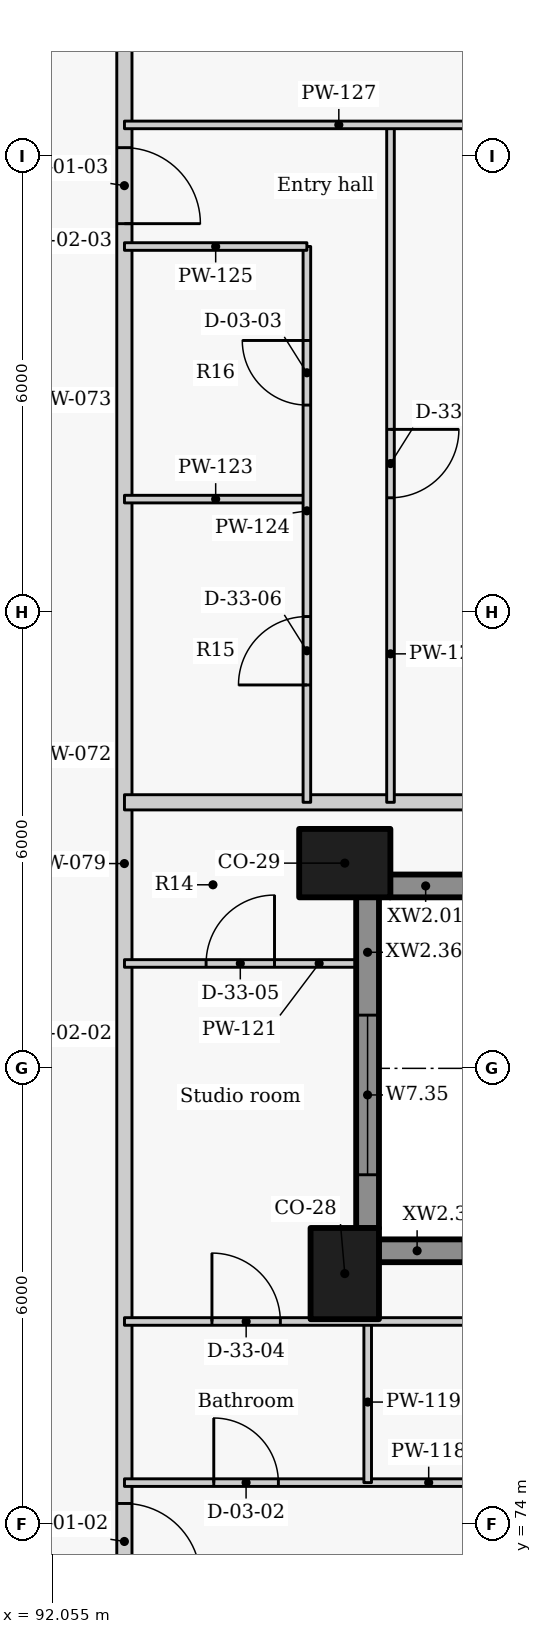
"""IFC4 building model, lengths in metres.
Left out: names, types, materials, properties, quantities, classifications, styles, units other than length and angle.
Written with IfcOpenShell. Run it as: python <this file> out.ifc"""

import sys

from ifc_helpers import new_model, si_unit, direction, frame, frame_2d, origin, origin_2d, place, context, subcontext, project, spatial, rectangle, extrude, element, fill, save


model = new_model("IFC4")
c1 = context("Model", 3, precision=1e-05, world=origin(), true_north=direction((0.0, 1.0)))
c2 = subcontext(c1, "Body", "Model", "MODEL_VIEW")
j1 = project(units=[si_unit("LENGTHUNIT", "METRE"), si_unit("PLANEANGLEUNIT", "RADIAN")], contexts=[c1])
p1 = place(None, origin())
s1 = spatial("IfcSite", under=j1, at=p1, CompositionType="ELEMENT")
p2 = place(p1, origin())
s2 = spatial("IfcBuilding", under=s1, at=p2, CompositionType="ELEMENT")
p3 = place(p2, frame((0.0, 0.0, 193.2)))
s3 = spatial("IfcBuildingStorey", under=s2, at=p3, CompositionType="ELEMENT", Elevation=193.2)
for number, where, z_axis, x_axis in (
    (1, (95.899, 77.3, 0.0), (0.0, 0.0, 1.0), (0.0, 1.0, 0.0)),
    (2, (95.899, 82.7, 0.0), (0.0, 0.0, 1.0), (1.0, 0.0, 0.0)),
):
    element("IfcColumn", number, at=place(p3, frame(where, z_axis=z_axis, x_axis=x_axis)), inside=s3, PredefinedType="COLUMN", context=c2, shape_type="SweptSolid", body=[
        extrude(rectangle(XDim=1.2, YDim=0.9, at=origin_2d()), origin(), (0.0, 0.0, 1.0), 3.3),
    ])
p4 = place(p3, frame((96.496, 82.4, 0.0), z_axis=(0.0, 0.0, 1.0), x_axis=(1.0, 0.0, 0.0)))
e3 = element("IfcWall", 3, at=p4, inside=s3, PredefinedType="SOLIDWALL", context=c2, shape_type="SweptSolid", body=[
    extrude(rectangle(XDim=4.172, YDim=0.3, at=frame_2d((2.086, 0.0))), origin(), (0.0, 0.0, 1.0), 2.425),
])
p5 = place(p4, frame((1.036, 0.0, 0.9)))
e4 = element("IfcOpeningElement", 4, at=p5, cuts=e3, PredefinedType="OPENING", context=c2, shape_type="SweptSolid", body=[
    extrude(rectangle(XDim=2.1, YDim=1.1, at=frame_2d((1.05, 0.55))), frame((0.0, 0.16, 0.0), z_axis=(0.0, -1.0, 0.0), x_axis=(1.0, 0.0, 0.0)), (0.0, 0.0, 1.0), 0.32),
])
p6 = place(p3, frame((99.101, 91.916, 0.0), z_axis=(0.0, 0.0, 1.0), x_axis=(-0.500059225181, 0.86599120741, 0.0)))
e5 = element("IfcWall", 5, at=p6, inside=s3, PredefinedType="SOLIDWALL", context=c2, shape_type="SweptSolid", body=[
    extrude(rectangle(XDim=3.744, YDim=0.3, at=frame_2d((1.872, 0.0))), origin(), (0.0, 0.0, 1.0), 2.425),
])
p7 = place(p6, frame((1.145, 0.0, 0.9)))
e6 = element("IfcOpeningElement", 6, at=p7, cuts=e5, PredefinedType="OPENING", context=c2, shape_type="SweptSolid", body=[
    extrude(rectangle(XDim=2.1, YDim=1.1, at=frame_2d((1.05, 0.55))), frame((0.0, 0.16, 0.0), z_axis=(0.0, -1.0, 0.0), x_axis=(1.0, 0.0, 0.0)), (0.0, 0.0, 1.0), 0.32),
])
p8 = place(p3, frame((100.668, 77.6, 0.0), z_axis=(0.0, 0.0, 1.0), x_axis=(-1.0, 0.0, 0.0)))
e7 = element("IfcWall", 7, at=p8, inside=s3, PredefinedType="SOLIDWALL", context=c2, shape_type="SweptSolid", body=[
    extrude(rectangle(XDim=4.323, YDim=0.3, at=frame_2d((2.161, 0.0))), origin(), (0.0, 0.0, 1.0), 2.425),
])
p9 = place(p8, frame((1.111, 0.0, 0.9)))
e8 = element("IfcOpeningElement", 8, at=p9, cuts=e7, PredefinedType="OPENING", context=c2, shape_type="SweptSolid", body=[
    extrude(rectangle(XDim=2.1, YDim=1.1, at=frame_2d((1.05, 0.55))), frame((0.0, 0.16, 0.0), z_axis=(0.0, -1.0, 0.0), x_axis=(1.0, 0.0, 0.0)), (0.0, 0.0, 1.0), 0.32),
])
p10 = place(p3, frame((96.199, 77.896, 0.0), z_axis=(0.0, 0.0, 1.0), x_axis=(0.0, 1.0, 0.0)))
e9 = element("IfcWall", 9, at=p10, inside=s3, PredefinedType="SOLIDWALL", context=c2, shape_type="SweptSolid", body=[
    extrude(rectangle(XDim=4.358, YDim=0.3, at=frame_2d((2.179, 0.0))), origin(), (0.0, 0.0, 1.0), 2.425),
])
p11 = place(p10, frame((0.704, 0.0, 0.9)))
e10 = element("IfcOpeningElement", 10, at=p11, cuts=e9, PredefinedType="OPENING", context=c2, shape_type="SweptSolid", body=[
    extrude(rectangle(XDim=2.1, YDim=1.1, at=frame_2d((1.05, 0.55))), frame((0.0, 0.16, 0.0), z_axis=(0.0, -1.0, 0.0), x_axis=(1.0, 0.0, 0.0)), (0.0, 0.0, 1.0), 0.32),
])
p12 = place(p3, frame((93.0, 101.281, 0.0), z_axis=(0.0, 0.0, 1.0), x_axis=(0.0, -1.0, 0.0)))
e11 = element("IfcWall", 11, at=p12, inside=s3, PredefinedType="PARTITIONING", context=c2, shape_type="SweptSolid", body=[
    extrude(rectangle(XDim=42.606, YDim=0.2, at=frame_2d((21.303, 0.0))), origin(), (0.0, 0.0, 1.0), 2.405),
])
p13 = place(p12, frame((39.33, 0.0, 0.0)))
e12 = element("IfcOpeningElement", 12, at=p13, cuts=e11, PredefinedType="OPENING", context=c2, shape_type="SweptSolid", body=[
    extrude(rectangle(XDim=1.0, YDim=2.1, at=frame_2d((0.5, 1.05))), frame((0.0, 0.11, 0.0), z_axis=(0.0, -1.0, 0.0), x_axis=(1.0, 0.0, 0.0)), (0.0, 0.0, 1.0), 0.22),
])
p14 = place(p12, frame((27.005, 0.0, 0.0)))
e13 = element("IfcOpeningElement", 13, at=p14, cuts=e11, PredefinedType="OPENING", context=c2, shape_type="SweptSolid", body=[
    extrude(rectangle(XDim=1.0, YDim=2.1, at=frame_2d((0.5, 1.05))), frame((0.0, 0.11, 0.0), z_axis=(0.0, -1.0, 0.0), x_axis=(1.0, 0.0, 0.0)), (0.0, 0.0, 1.0), 0.22),
])
p15 = place(p12, frame((9.168, 0.0, 0.0)))
e14 = element("IfcOpeningElement", 14, at=p15, cuts=e11, PredefinedType="OPENING", context=c2, shape_type="SweptSolid", body=[
    extrude(rectangle(XDim=1.0, YDim=2.1, at=frame_2d((0.5, 1.05))), frame((0.0, 0.11, 0.0), z_axis=(0.0, -1.0, 0.0), x_axis=(1.0, 0.0, 0.0)), (0.0, 0.0, 1.0), 0.22),
])
p16 = place(p12, frame((3.937, 0.0, 0.0)))
e15 = element("IfcOpeningElement", 15, at=p16, cuts=e11, PredefinedType="OPENING", context=c2, shape_type="SweptSolid", body=[
    extrude(rectangle(XDim=1.0, YDim=2.1, at=frame_2d((0.5, 1.05))), frame((0.0, 0.11, 0.0), z_axis=(0.0, -1.0, 0.0), x_axis=(1.0, 0.0, 0.0)), (0.0, 0.0, 1.0), 0.22),
])
p17 = place(p3, frame((93.001, 74.55, 0.0), z_axis=(0.0, 0.0, 1.0), x_axis=(1.0, 0.0, 0.0)))
e16 = element("IfcWall", 16, at=p17, inside=s3, PredefinedType="PARTITIONING", context=c2, shape_type="SweptSolid", body=[
    extrude(rectangle(XDim=9.66, YDim=0.1, at=frame_2d((4.83, 0.0))), origin(), (0.0, 0.0, 1.0), 2.405),
])
p18 = place(p17, frame((1.175, 0.0, 0.0)))
e17 = element("IfcOpeningElement", 17, at=p18, cuts=e16, PredefinedType="OPENING", context=c2, shape_type="SweptSolid", body=[
    extrude(rectangle(XDim=0.85, YDim=2.1, at=frame_2d((0.425, 1.05))), frame((0.0, 0.06, 0.0), z_axis=(0.0, -1.0, 0.0), x_axis=(1.0, 0.0, 0.0)), (0.0, 0.0, 1.0), 0.12),
])
p19 = place(p17, frame((5.98, 0.0, 0.0)))
e18 = element("IfcOpeningElement", 18, at=p19, cuts=e16, PredefinedType="OPENING", context=c2, shape_type="SweptSolid", body=[
    extrude(rectangle(XDim=0.9, YDim=2.1, at=frame_2d((0.45, 1.05))), frame((0.0, 0.06, 0.0), z_axis=(0.0, -1.0, 0.0), x_axis=(1.0, 0.0, 0.0)), (0.0, 0.0, 1.0), 0.12),
])
p20 = place(p3, frame((96.201, 74.55, 0.0), z_axis=(0.0, 0.0, 1.0), x_axis=(0.0, 1.0, 0.0)))
e19 = element("IfcWall", 19, at=p20, inside=s3, PredefinedType="PARTITIONING", context=c2, shape_type="SweptSolid", body=[
    extrude(rectangle(XDim=2.12, YDim=0.1, at=frame_2d((1.06, 0.0))), origin(), (0.0, 0.0, 1.0), 3.025),
])
p21 = place(p3, frame((93.001, 76.67, 0.0), z_axis=(0.0, 0.0, 1.0), x_axis=(1.0, 0.0, 0.0)))
e20 = element("IfcWall", 20, at=p21, inside=s3, PredefinedType="PARTITIONING", context=c2, shape_type="SweptSolid", body=[
    extrude(rectangle(XDim=10.884, YDim=0.1, at=frame_2d((5.442, 0.0))), origin(), (0.0, 0.0, 1.0), 2.405),
])
p22 = place(p21, frame((1.151, 0.0, 0.0)))
e21 = element("IfcOpeningElement", 21, at=p22, cuts=e20, PredefinedType="OPENING", context=c2, shape_type="SweptSolid", body=[
    extrude(rectangle(XDim=0.9, YDim=2.1, at=frame_2d((0.45, 1.05))), frame((0.0, 0.06, 0.0), z_axis=(0.0, -1.0, 0.0), x_axis=(1.0, 0.0, 0.0)), (0.0, 0.0, 1.0), 0.12),
])
p23 = place(p3, frame((93.001, 81.38, 0.0), z_axis=(0.0, 0.0, 1.0), x_axis=(1.0, 0.0, 0.0)))
e22 = element("IfcWall", 22, at=p23, inside=s3, PredefinedType="PARTITIONING", context=c2, shape_type="SweptSolid", body=[
    extrude(rectangle(XDim=3.049, YDim=0.1, at=frame_2d((1.524, 0.0))), origin(), (0.0, 0.0, 1.0), 2.405),
])
p24 = place(p23, frame((1.074, 0.0, 0.0)))
e23 = element("IfcOpeningElement", 23, at=p24, cuts=e22, PredefinedType="OPENING", context=c2, shape_type="SweptSolid", body=[
    extrude(rectangle(XDim=0.9, YDim=2.1, at=frame_2d((0.45, 1.05))), frame((0.0, 0.06, 0.0), z_axis=(0.0, -1.0, 0.0), x_axis=(1.0, 0.0, 0.0)), (0.0, 0.0, 1.0), 0.12),
])
p25 = place(p3, frame((93.001, 83.5, 0.0), z_axis=(0.0, 0.0, 1.0), x_axis=(1.0, 0.0, 0.0)))
e24 = element("IfcWall", 24, at=p25, inside=s3, PredefinedType="PARTITIONING", context=c2, shape_type="SweptSolid", body=[
    extrude(rectangle(XDim=10.786, YDim=0.2, at=frame_2d((5.393, 0.0))), origin(), (0.0, 0.0, 1.0), 2.405),
])
p26 = place(p3, frame((93.001, 87.489, 0.0), z_axis=(0.0, 0.0, 1.0), x_axis=(1.0, 0.0, 0.0)))
e25 = element("IfcWall", 25, at=p26, inside=s3, PredefinedType="PARTITIONING", context=c2, shape_type="SweptSolid", body=[
    extrude(rectangle(XDim=2.4, YDim=0.1, at=frame_2d((1.2, 0.0))), origin(), (0.0, 0.0, 1.0), 3.025),
])
p27 = place(p3, frame((95.401, 83.5, 0.0), z_axis=(0.0, 0.0, 1.0), x_axis=(0.0, 1.0, 0.0)))
e26 = element("IfcWall", 26, at=p27, inside=s3, PredefinedType="PARTITIONING", context=c2, shape_type="SweptSolid", body=[
    extrude(rectangle(XDim=7.312, YDim=0.1, at=frame_2d((3.656, 0.0))), origin(), (0.0, 0.0, 1.0), 3.025),
])
p28 = place(p27, frame((1.544, 0.0, 0.0)))
e27 = element("IfcOpeningElement", 27, at=p28, cuts=e26, PredefinedType="OPENING", context=c2, shape_type="SweptSolid", body=[
    extrude(rectangle(XDim=0.9, YDim=2.1, at=frame_2d((0.45, 1.05))), frame((0.0, 0.06, 0.0), z_axis=(0.0, -1.0, 0.0), x_axis=(1.0, 0.0, 0.0)), (0.0, 0.0, 1.0), 0.12),
])
p29 = place(p27, frame((5.226, 0.0, 0.0)))
e28 = element("IfcOpeningElement", 28, at=p29, cuts=e26, PredefinedType="OPENING", context=c2, shape_type="SweptSolid", body=[
    extrude(rectangle(XDim=0.85, YDim=2.1, at=frame_2d((0.425, 1.05))), frame((0.0, 0.06, 0.0), z_axis=(0.0, -1.0, 0.0), x_axis=(1.0, 0.0, 0.0)), (0.0, 0.0, 1.0), 0.12),
])
p30 = place(p3, frame((93.001, 90.812, 0.0), z_axis=(0.0, 0.0, 1.0), x_axis=(1.0, 0.0, 0.0)))
e29 = element("IfcWall", 29, at=p30, inside=s3, PredefinedType="PARTITIONING", context=c2, shape_type="SweptSolid", body=[
    extrude(rectangle(XDim=2.4, YDim=0.1, at=frame_2d((1.2, 0.0))), origin(), (0.0, 0.0, 1.0), 3.025),
])
p31 = place(p3, frame((96.501, 92.413, 0.0), z_axis=(0.0, 0.0, 1.0), x_axis=(0.0, -1.0, 0.0)))
e30 = element("IfcWall", 30, at=p31, inside=s3, PredefinedType="PARTITIONING", context=c2, shape_type="SweptSolid", body=[
    extrude(rectangle(XDim=8.913, YDim=0.1, at=frame_2d((4.456, 0.0))), origin(), (0.0, 0.0, 1.0), 3.025),
])
p32 = place(p31, frame((4.006, 0.0, 0.0)))
e31 = element("IfcOpeningElement", 31, at=p32, cuts=e30, PredefinedType="OPENING", context=c2, shape_type="SweptSolid", body=[
    extrude(rectangle(XDim=0.9, YDim=2.1, at=frame_2d((0.45, 1.05))), frame((0.0, 0.06, 0.0), z_axis=(0.0, -1.0, 0.0), x_axis=(1.0, 0.0, 0.0)), (0.0, 0.0, 1.0), 0.12),
])
p33 = place(p3, frame((93.001, 92.412, 0.0), z_axis=(0.0, 0.0, 1.0), x_axis=(1.0, 0.0, 0.0)))
e32 = element("IfcWall", 32, at=p33, inside=s3, PredefinedType="PARTITIONING", context=c2, shape_type="SweptSolid", body=[
    extrude(rectangle(XDim=5.64, YDim=0.1, at=frame_2d((2.82, 0.0))), origin(), (0.0, 0.0, 1.0), 2.405),
])
p34 = place(p11, origin())
e33 = element("IfcWindow", 33, at=p34, inside=s3, PartitioningType="SINGLE_PANEL", PredefinedType="WINDOW", context=c2, shape_type="SweptSolid", body=[
    extrude(rectangle(XDim=2.1, YDim=1.1, at=frame_2d((1.05, 0.55))), frame((0.0, 0.03, 0.0), z_axis=(0.0, -1.0, 0.0), x_axis=(1.0, 0.0, 0.0)), (0.0, 0.0, 1.0), 0.06),
])
fill(e10, e33)
p35 = place(p14, origin())
e34 = element("IfcDoor", 34, at=p35, inside=s3, OperationType="SINGLE_SWING_RIGHT", PredefinedType="DOOR", context=c2, shape_type="SweptSolid", body=[
    extrude(rectangle(XDim=1.0, YDim=2.1, at=frame_2d((0.5, 1.05))), frame((0.0, 0.025, 0.0), z_axis=(0.0, -1.0, 0.0), x_axis=(1.0, 0.0, 0.0)), (0.0, 0.0, 1.0), 0.05),
])
fill(e13, e34)
p36 = place(p18, origin())
e35 = element("IfcDoor", 35, at=p36, inside=s3, OperationType="SINGLE_SWING_LEFT", PredefinedType="DOOR", context=c2, shape_type="SweptSolid", body=[
    extrude(rectangle(XDim=0.85, YDim=2.1, at=frame_2d((0.425, 1.05))), frame((0.0, 0.025, 0.0), z_axis=(0.0, -1.0, 0.0), x_axis=(1.0, 0.0, 0.0)), (0.0, 0.0, 1.0), 0.05),
])
fill(e17, e35)
p37 = place(p22, origin())
e36 = element("IfcDoor", 36, at=p37, inside=s3, OperationType="SINGLE_SWING_LEFT", PredefinedType="DOOR", context=c2, shape_type="SweptSolid", body=[
    extrude(rectangle(XDim=0.9, YDim=2.1, at=frame_2d((0.45, 1.05))), frame((0.0, 0.025, 0.0), z_axis=(0.0, -1.0, 0.0), x_axis=(1.0, 0.0, 0.0)), (0.0, 0.0, 1.0), 0.05),
])
fill(e21, e36)
p38 = place(p24, origin())
e37 = element("IfcDoor", 37, at=p38, inside=s3, OperationType="SINGLE_SWING_RIGHT", PredefinedType="DOOR", context=c2, shape_type="SweptSolid", body=[
    extrude(rectangle(XDim=0.9, YDim=2.1, at=frame_2d((0.45, 1.05))), frame((0.0, 0.025, 0.0), z_axis=(0.0, -1.0, 0.0), x_axis=(1.0, 0.0, 0.0)), (0.0, 0.0, 1.0), 0.05),
])
fill(e23, e37)
p39 = place(p15, origin())
e38 = element("IfcDoor", 38, at=p39, inside=s3, OperationType="SINGLE_SWING_RIGHT", PredefinedType="DOOR", context=c2, shape_type="SweptSolid", body=[
    extrude(rectangle(XDim=1.0, YDim=2.1, at=frame_2d((0.5, 1.05))), frame((0.0, 0.025, 0.0), z_axis=(0.0, -1.0, 0.0), x_axis=(1.0, 0.0, 0.0)), (0.0, 0.0, 1.0), 0.05),
])
fill(e14, e38)
p40 = place(p28, origin())
e39 = element("IfcDoor", 39, at=p40, inside=s3, OperationType="SINGLE_SWING_LEFT", PredefinedType="DOOR", context=c2, shape_type="SweptSolid", body=[
    extrude(rectangle(XDim=0.9, YDim=2.1, at=frame_2d((0.45, 1.05))), frame((0.0, 0.025, 0.0), z_axis=(0.0, -1.0, 0.0), x_axis=(1.0, 0.0, 0.0)), (0.0, 0.0, 1.0), 0.05),
])
fill(e27, e39)
p41 = place(p29, origin())
e40 = element("IfcDoor", 40, at=p41, inside=s3, OperationType="SINGLE_SWING_RIGHT", PredefinedType="DOOR", context=c2, shape_type="SweptSolid", body=[
    extrude(rectangle(XDim=0.85, YDim=2.1, at=frame_2d((0.425, 1.05))), frame((0.0, 0.025, 0.0), z_axis=(0.0, -1.0, 0.0), x_axis=(1.0, 0.0, 0.0)), (0.0, 0.0, 1.0), 0.05),
])
fill(e28, e40)
p42 = place(p32, origin())
e41 = element("IfcDoor", 41, at=p42, inside=s3, OperationType="SINGLE_SWING_LEFT", PredefinedType="DOOR", context=c2, shape_type="SweptSolid", body=[
    extrude(rectangle(XDim=0.9, YDim=2.1, at=frame_2d((0.45, 1.05))), frame((0.0, 0.025, 0.0), z_axis=(0.0, -1.0, 0.0), x_axis=(1.0, 0.0, 0.0)), (0.0, 0.0, 1.0), 0.05),
])
fill(e31, e41)
save(model, sys.argv[1])
